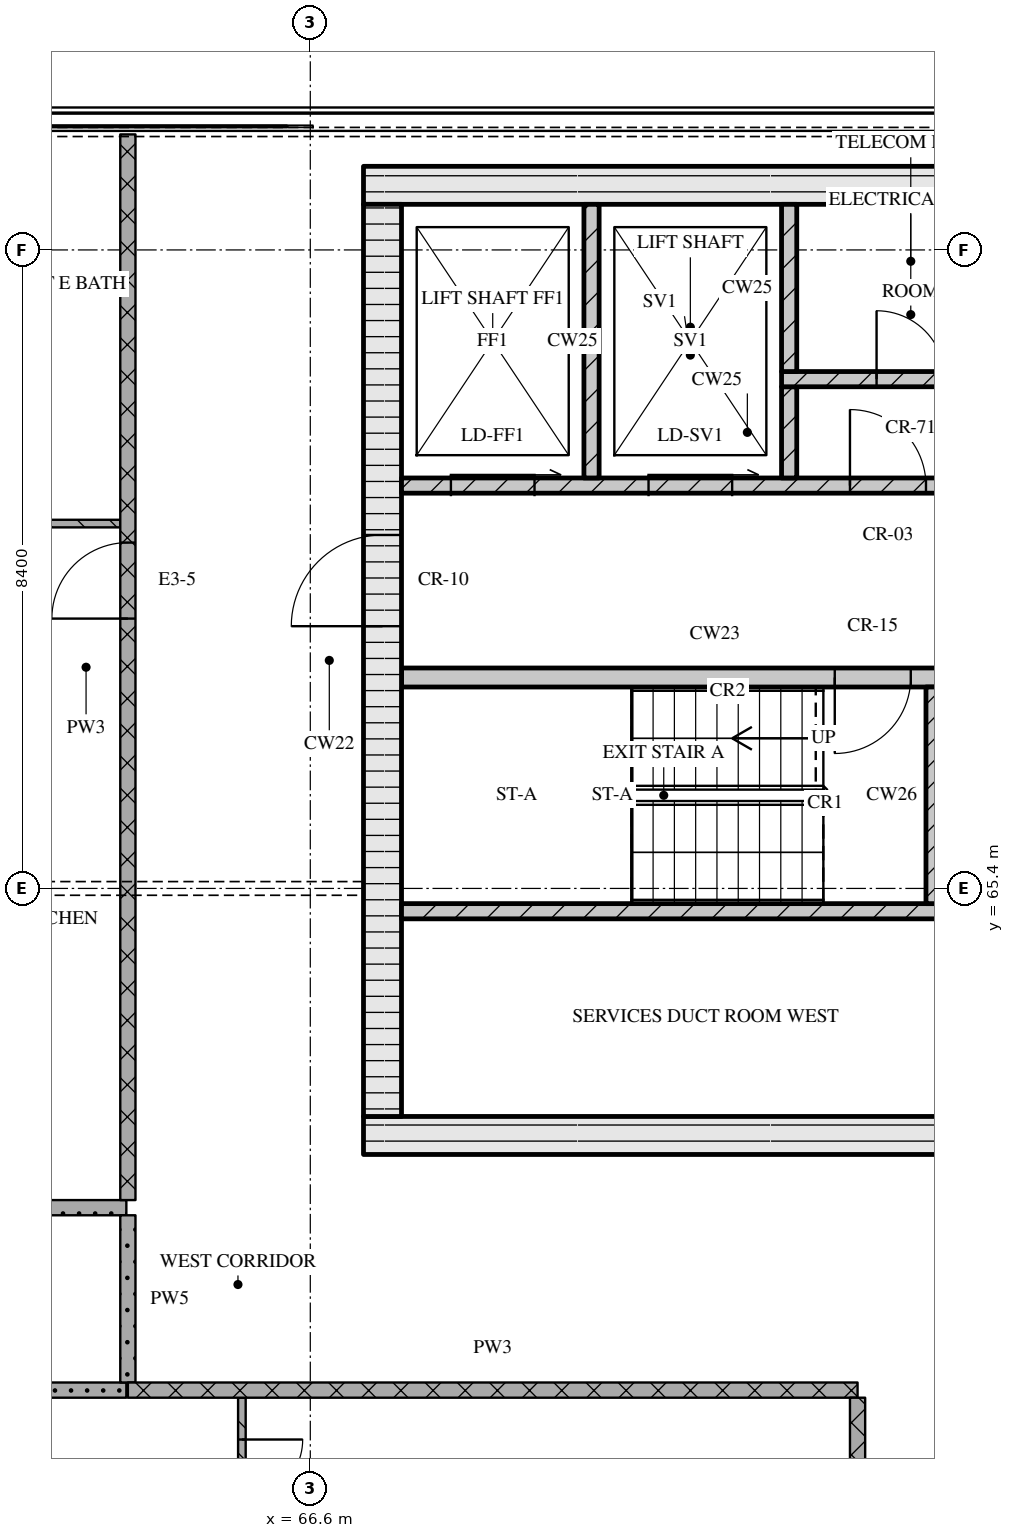
"""IFC4 building model, lengths in metres.
Left out: names, types, materials, properties, quantities, classifications, styles, units other than length and angle.
Written with IfcOpenShell. Run it as: python <this file> out.ifc"""

import sys

from ifc_helpers import new_model, si_unit, direction, frame, frame_2d, origin, place, context, subcontext, project, spatial, rectangle, extrude, element, fill, save


model = new_model("IFC4")
c1 = context("Model", 3, precision=1e-05, world=origin(), true_north=direction((0.0, 1.0)))
c2 = subcontext(c1, "Body", "Model", "MODEL_VIEW")
j1 = project(units=[si_unit("LENGTHUNIT", "METRE"), si_unit("PLANEANGLEUNIT", "RADIAN")], contexts=[c1])
p1 = place(None, origin())
s1 = spatial("IfcSite", under=j1, at=p1, CompositionType="ELEMENT")
p2 = place(p1, origin())
s2 = spatial("IfcBuilding", under=s1, at=p2, CompositionType="ELEMENT")
p3 = place(p2, frame((0.0, 0.0, 281.55)))
s3 = spatial("IfcBuildingStorey", under=s2, at=p3, CompositionType="ELEMENT", Elevation=281.55)
p4 = place(p3, frame((67.3, 62.15, 0.0), z_axis=(0.0, 0.0, 1.0), x_axis=(1.0, 0.0, 0.0)))
e1 = element("IfcWall", 1, at=p4, inside=s3, PredefinedType="SOLIDWALL", context=c2, shape_type="SweptSolid", body=[
    extrude(rectangle(XDim=40.6, YDim=0.5, at=frame_2d((20.3, 0.0))), origin(), (0.0, 0.0, 1.0), 3.32),
])
p5 = place(p4, frame((20.65, 0.0, 0.0)))
e2 = element("IfcOpeningElement", 2, at=p5, cuts=e1, PredefinedType="OPENING", context=c2, shape_type="SweptSolid", body=[
    extrude(rectangle(XDim=1.8, YDim=2.1, at=frame_2d((0.9, 1.05))), frame((0.0, 0.26, 0.0), z_axis=(0.0, -1.0, 0.0), x_axis=(1.0, 0.0, 0.0)), (0.0, 0.0, 1.0), 0.52),
])
p6 = place(p3, frame((67.3, 74.65, 0.0), z_axis=(0.0, 0.0, 1.0), x_axis=(1.0, 0.0, 0.0)))
e3 = element("IfcWall", 3, at=p6, inside=s3, PredefinedType="SOLIDWALL", context=c2, shape_type="SweptSolid", body=[
    extrude(rectangle(XDim=40.6, YDim=0.5, at=frame_2d((20.3, 0.0))), origin(), (0.0, 0.0, 1.0), 3.32),
])
p7 = place(p3, frame((67.55, 62.4, 0.0), z_axis=(0.0, 0.0, 1.0), x_axis=(0.0, 1.0, 0.0)))
e4 = element("IfcWall", 4, at=p7, inside=s3, PredefinedType="SOLIDWALL", context=c2, shape_type="SweptSolid", body=[
    extrude(rectangle(XDim=12.0, YDim=0.5, at=frame_2d((6.0, 0.0))), origin(), (0.0, 0.0, 1.0), 3.32),
])
p8 = place(p7, frame((6.45, 0.0, 0.0)))
e5 = element("IfcOpeningElement", 5, at=p8, cuts=e4, PredefinedType="OPENING", context=c2, shape_type="SweptSolid", body=[
    extrude(rectangle(XDim=1.2, YDim=2.1, at=frame_2d((0.6, 1.05))), frame((0.0, 0.26, 0.0), z_axis=(0.0, -1.0, 0.0), x_axis=(1.0, 0.0, 0.0)), (0.0, 0.0, 1.0), 0.52),
])
p9 = place(p3, frame((67.8, 65.1, 0.0), z_axis=(0.0, 0.0, 1.0), x_axis=(1.0, 0.0, 0.0)))
e6 = element("IfcWall", 6, at=p9, inside=s3, PredefinedType="SOLIDWALL", context=c2, shape_type="SweptSolid", body=[
    extrude(rectangle(XDim=18.5, YDim=0.2, at=frame_2d((9.25, 0.0))), origin(), (0.0, 0.0, 1.0), 3.32),
])
p10 = place(p9, frame((7.27, 0.0, 0.0)))
e7 = element("IfcOpeningElement", 7, at=p10, cuts=e6, PredefinedType="OPENING", context=c2, shape_type="SweptSolid", body=[
    extrude(rectangle(XDim=0.9, YDim=2.1, at=frame_2d((0.45, 1.05))), frame((0.0, 0.11, 0.0), z_axis=(0.0, -1.0, 0.0), x_axis=(1.0, 0.0, 0.0)), (0.0, 0.0, 1.0), 0.22),
])
p11 = place(p9, frame((9.05, 0.0, 0.0)))
e8 = element("IfcOpeningElement", 8, at=p11, cuts=e6, PredefinedType="OPENING", context=c2, shape_type="SweptSolid", body=[
    extrude(rectangle(XDim=0.9, YDim=2.1, at=frame_2d((0.45, 1.05))), frame((0.0, 0.11, 0.0), z_axis=(0.0, -1.0, 0.0), x_axis=(1.0, 0.0, 0.0)), (0.0, 0.0, 1.0), 0.22),
])
p12 = place(p9, frame((12.76, 0.0, 0.0)))
e9 = element("IfcOpeningElement", 9, at=p12, cuts=e6, PredefinedType="OPENING", context=c2, shape_type="SweptSolid", body=[
    extrude(rectangle(XDim=0.9, YDim=2.1, at=frame_2d((0.45, 1.05))), frame((0.0, 0.11, 0.0), z_axis=(0.0, -1.0, 0.0), x_axis=(1.0, 0.0, 0.0)), (0.0, 0.0, 1.0), 0.22),
])
p13 = place(p9, frame((16.7, 0.0, 0.0)))
e10 = element("IfcOpeningElement", 10, at=p13, cuts=e6, PredefinedType="OPENING", context=c2, shape_type="SweptSolid", body=[
    extrude(rectangle(XDim=0.9, YDim=2.1, at=frame_2d((0.45, 1.05))), frame((0.0, 0.11, 0.0), z_axis=(0.0, -1.0, 0.0), x_axis=(1.0, 0.0, 0.0)), (0.0, 0.0, 1.0), 0.22),
])
p14 = place(p3, frame((74.85, 65.2, 0.0), z_axis=(0.0, 0.0, 1.0), x_axis=(0.0, 1.0, 0.0)))
e11 = element("IfcWall", 11, at=p14, inside=s3, PredefinedType="SOLIDWALL", context=c2, shape_type="SweptSolid", body=[
    extrude(rectangle(XDim=2.85, YDim=0.3, at=frame_2d((1.425, 0.0))), origin(), (0.0, 0.0, 1.0), 3.32),
])
p15 = place(p3, frame((67.8, 68.175, 0.0), z_axis=(0.0, 0.0, 1.0), x_axis=(1.0, 0.0, 0.0)))
e12 = element("IfcWall", 12, at=p15, inside=s3, PredefinedType="SOLIDWALL", context=c2, shape_type="SweptSolid", body=[
    extrude(rectangle(XDim=8.25, YDim=0.25, at=frame_2d((4.125, 0.0))), origin(), (0.0, 0.0, 1.0), 3.32),
])
p16 = place(p15, frame((5.7, 0.0, 0.0)))
e13 = element("IfcOpeningElement", 13, at=p16, cuts=e12, PredefinedType="OPENING", context=c2, shape_type="SweptSolid", body=[
    extrude(rectangle(XDim=1.0, YDim=2.1, at=frame_2d((0.5, 1.05))), frame((0.0, 0.135, 0.0), z_axis=(0.0, -1.0, 0.0), x_axis=(1.0, 0.0, 0.0)), (0.0, 0.0, 1.0), 0.27),
])
p17 = place(p15, frame((7.2, 0.0, 0.0)))
e14 = element("IfcOpeningElement", 14, at=p17, cuts=e12, PredefinedType="OPENING", context=c2, shape_type="SweptSolid", body=[
    extrude(rectangle(XDim=0.8, YDim=2.1, at=frame_2d((0.4, 1.05))), frame((0.0, 0.135, 0.0), z_axis=(0.0, -1.0, 0.0), x_axis=(1.0, 0.0, 0.0)), (0.0, 0.0, 1.0), 0.27),
])
p18 = place(p3, frame((67.8, 70.7, 0.0), z_axis=(0.0, 0.0, 1.0), x_axis=(1.0, 0.0, 0.0)))
e15 = element("IfcWall", 15, at=p18, inside=s3, PredefinedType="SOLIDWALL", context=c2, shape_type="SweptSolid", body=[
    extrude(rectangle(XDim=39.6, YDim=0.2, at=frame_2d((19.8, 0.0))), origin(), (0.0, 0.0, 1.0), 3.32),
])
p19 = place(p18, frame((0.65, 0.0, 0.0)))
e16 = element("IfcOpeningElement", 16, at=p19, cuts=e15, PredefinedType="OPENING", context=c2, shape_type="SweptSolid", body=[
    extrude(rectangle(XDim=1.1, YDim=2.1, at=frame_2d((0.55, 1.05))), frame((0.0, 0.11, 0.0), z_axis=(0.0, -1.0, 0.0), x_axis=(1.0, 0.0, 0.0)), (0.0, 0.0, 1.0), 0.22),
])
p20 = place(p18, frame((3.25, 0.0, 0.0)))
e17 = element("IfcOpeningElement", 17, at=p20, cuts=e15, PredefinedType="OPENING", context=c2, shape_type="SweptSolid", body=[
    extrude(rectangle(XDim=1.1, YDim=2.1, at=frame_2d((0.55, 1.05))), frame((0.0, 0.11, 0.0), z_axis=(0.0, -1.0, 0.0), x_axis=(1.0, 0.0, 0.0)), (0.0, 0.0, 1.0), 0.22),
])
p21 = place(p18, frame((5.9, 0.0, 0.0)))
e18 = element("IfcOpeningElement", 18, at=p21, cuts=e15, PredefinedType="OPENING", context=c2, shape_type="SweptSolid", body=[
    extrude(rectangle(XDim=1.0, YDim=2.1, at=frame_2d((0.5, 1.05))), frame((0.0, 0.11, 0.0), z_axis=(0.0, -1.0, 0.0), x_axis=(1.0, 0.0, 0.0)), (0.0, 0.0, 1.0), 0.22),
])
p22 = place(p18, frame((21.7, 0.0, 0.0)))
e19 = element("IfcOpeningElement", 19, at=p22, cuts=e15, PredefinedType="OPENING", context=c2, shape_type="SweptSolid", body=[
    extrude(rectangle(XDim=1.0, YDim=2.1, at=frame_2d((0.5, 1.05))), frame((0.0, 0.11, 0.0), z_axis=(0.0, -1.0, 0.0), x_axis=(1.0, 0.0, 0.0)), (0.0, 0.0, 1.0), 0.22),
])
p23 = place(p18, frame((32.7, 0.0, 0.0)))
e20 = element("IfcOpeningElement", 20, at=p23, cuts=e15, PredefinedType="OPENING", context=c2, shape_type="SweptSolid", body=[
    extrude(rectangle(XDim=1.0, YDim=2.1, at=frame_2d((0.5, 1.05))), frame((0.0, 0.11, 0.0), z_axis=(0.0, -1.0, 0.0), x_axis=(1.0, 0.0, 0.0)), (0.0, 0.0, 1.0), 0.22),
])
p24 = place(p18, frame((35.25, 0.0, 0.0)))
e21 = element("IfcOpeningElement", 21, at=p24, cuts=e15, PredefinedType="OPENING", context=c2, shape_type="SweptSolid", body=[
    extrude(rectangle(XDim=1.1, YDim=2.1, at=frame_2d((0.55, 1.05))), frame((0.0, 0.11, 0.0), z_axis=(0.0, -1.0, 0.0), x_axis=(1.0, 0.0, 0.0)), (0.0, 0.0, 1.0), 0.22),
])
p25 = place(p18, frame((37.85, 0.0, 0.0)))
e22 = element("IfcOpeningElement", 22, at=p25, cuts=e15, PredefinedType="OPENING", context=c2, shape_type="SweptSolid", body=[
    extrude(rectangle(XDim=1.1, YDim=2.1, at=frame_2d((0.55, 1.05))), frame((0.0, 0.11, 0.0), z_axis=(0.0, -1.0, 0.0), x_axis=(1.0, 0.0, 0.0)), (0.0, 0.0, 1.0), 0.22),
])
p26 = place(p3, frame((70.3, 70.8, 0.0), z_axis=(0.0, 0.0, 1.0), x_axis=(0.0, 1.0, 0.0)))
e23 = element("IfcWall", 23, at=p26, inside=s3, PredefinedType="SOLIDWALL", context=c2, shape_type="SweptSolid", body=[
    extrude(rectangle(XDim=3.6, YDim=0.2, at=frame_2d((1.8, 0.0))), origin(), (0.0, 0.0, 1.0), 3.32),
])
p27 = place(p3, frame((72.9, 70.8, 0.0), z_axis=(0.0, 0.0, 1.0), x_axis=(0.0, 1.0, 0.0)))
e24 = element("IfcWall", 24, at=p27, inside=s3, PredefinedType="SOLIDWALL", context=c2, shape_type="SweptSolid", body=[
    extrude(rectangle(XDim=1.2, YDim=0.2, at=frame_2d((0.6, 0.0))), origin(), (0.0, 0.0, 1.0), 3.32),
])
p28 = place(p3, frame((72.8, 72.1, 0.0), z_axis=(0.0, 0.0, 1.0), x_axis=(1.0, 0.0, 0.0)))
e25 = element("IfcWall", 25, at=p28, inside=s3, PredefinedType="SOLIDWALL", context=c2, shape_type="SweptSolid", body=[
    extrude(rectangle(XDim=7.72, YDim=0.2, at=frame_2d((3.86, 0.0))), origin(), (0.0, 0.0, 1.0), 3.32),
])
p29 = place(p28, frame((1.25, 0.0, 0.0)))
e26 = element("IfcOpeningElement", 26, at=p29, cuts=e25, PredefinedType="OPENING", context=c2, shape_type="SweptSolid", body=[
    extrude(rectangle(XDim=0.9, YDim=2.1, at=frame_2d((0.45, 1.05))), frame((0.0, 0.11, 0.0), z_axis=(0.0, -1.0, 0.0), x_axis=(1.0, 0.0, 0.0)), (0.0, 0.0, 1.0), 0.22),
])
p30 = place(p28, frame((4.2, 0.0, 0.0)))
e27 = element("IfcOpeningElement", 27, at=p30, cuts=e25, PredefinedType="OPENING", context=c2, shape_type="SweptSolid", body=[
    extrude(rectangle(XDim=0.9, YDim=2.1, at=frame_2d((0.45, 1.05))), frame((0.0, 0.11, 0.0), z_axis=(0.0, -1.0, 0.0), x_axis=(1.0, 0.0, 0.0)), (0.0, 0.0, 1.0), 0.22),
])
p31 = place(p28, frame((6.36, 0.0, 0.0)))
e28 = element("IfcOpeningElement", 28, at=p31, cuts=e25, PredefinedType="OPENING", context=c2, shape_type="SweptSolid", body=[
    extrude(rectangle(XDim=0.9, YDim=2.1, at=frame_2d((0.45, 1.05))), frame((0.0, 0.11, 0.0), z_axis=(0.0, -1.0, 0.0), x_axis=(1.0, 0.0, 0.0)), (0.0, 0.0, 1.0), 0.22),
])
p32 = place(p3, frame((72.9, 72.2, 0.0), z_axis=(0.0, 0.0, 1.0), x_axis=(0.0, 1.0, 0.0)))
e29 = element("IfcWall", 29, at=p32, inside=s3, PredefinedType="SOLIDWALL", context=c2, shape_type="SweptSolid", body=[
    extrude(rectangle(XDim=2.2, YDim=0.2, at=frame_2d((1.1, 0.0))), origin(), (0.0, 0.0, 1.0), 3.32),
])
p33 = place(p3, frame((64.2, 58.8, 0.0), z_axis=(0.0, 0.0, 1.0), x_axis=(1.0, 0.0, 0.0)))
e30 = element("IfcWall", 30, at=p33, inside=s3, PredefinedType="PARTITIONING", context=c2, shape_type="SweptSolid", body=[
    extrude(rectangle(XDim=9.6, YDim=0.2, at=frame_2d((4.8, 0.0))), origin(), (0.0, 0.0, 1.0), 3.32),
])
p34 = place(p3, frame((56.7, 58.8, 0.0), z_axis=(0.0, 0.0, 1.0), x_axis=(1.0, 0.0, 0.0)))
e31 = element("IfcWall", 31, at=p34, inside=s3, PredefinedType="PARTITIONING", context=c2, shape_type="SweptSolid", body=[
    extrude(rectangle(XDim=7.48, YDim=0.2, at=frame_2d((3.74, 0.0))), origin(), (0.0, 0.0, 1.0), 3.32),
])
p35 = place(p3, frame((61.52, 61.2, 0.0), z_axis=(0.0, 0.0, 1.0), x_axis=(1.0, 0.0, 0.0)))
e32 = element("IfcWall", 32, at=p35, inside=s3, PredefinedType="PARTITIONING", context=c2, shape_type="SweptSolid", body=[
    extrude(rectangle(XDim=2.66, YDim=0.2, at=frame_2d((1.33, 0.0))), origin(), (0.0, 0.0, 1.0), 3.32),
])
p36 = place(p3, frame((61.5, 70.2, 0.0), z_axis=(0.0, 0.0, 1.0), x_axis=(1.0, 0.0, 0.0)))
e33 = element("IfcWall", 33, at=p36, inside=s3, PredefinedType="PARTITIONING", context=c2, shape_type="SweptSolid", body=[
    extrude(rectangle(XDim=2.6, YDim=0.1, at=frame_2d((1.3, 0.0))), origin(), (0.0, 0.0, 1.0), 3.32),
])
p37 = place(p3, frame((64.2, 61.3, 0.0), z_axis=(0.0, 0.0, 1.0), x_axis=(0.0, 1.0, 0.0)))
e34 = element("IfcWall", 34, at=p37, inside=s3, PredefinedType="PARTITIONING", context=c2, shape_type="SweptSolid", body=[
    extrude(rectangle(XDim=14.02, YDim=0.2, at=frame_2d((7.01, 0.0))), origin(), (0.0, 0.0, 1.0), 3.32),
])
p38 = place(p37, frame((7.65, 0.0, 0.0)))
e35 = element("IfcOpeningElement", 35, at=p38, cuts=e34, PredefinedType="OPENING", context=c2, shape_type="SweptSolid", body=[
    extrude(rectangle(XDim=1.0, YDim=2.1, at=frame_2d((0.5, 1.05))), frame((0.0, 0.11, 0.0), z_axis=(0.0, -1.0, 0.0), x_axis=(1.0, 0.0, 0.0)), (0.0, 0.0, 1.0), 0.22),
])
p39 = place(p3, frame((64.2, 61.1, 0.0), z_axis=(0.0, 0.0, 1.0), x_axis=(0.0, -1.0, 0.0)))
e36 = element("IfcWall", 36, at=p39, inside=s3, PredefinedType="PARTITIONING", context=c2, shape_type="SweptSolid", body=[
    extrude(rectangle(XDim=2.2, YDim=0.2, at=frame_2d((1.1, 0.0))), origin(), (0.0, 0.0, 1.0), 3.32),
])
p40 = place(p3, frame((65.7, 58.7, 0.0), z_axis=(0.0, 0.0, 1.0), x_axis=(0.0, -1.0, 0.0)))
e37 = element("IfcWall", 37, at=p40, inside=s3, PredefinedType="PARTITIONING", context=c2, shape_type="SweptSolid", body=[
    extrude(rectangle(XDim=2.25, YDim=0.1, at=frame_2d((1.125, 0.0))), origin(), (0.0, 0.0, 1.0), 3.32),
])
p41 = place(p40, frame((0.55, 0.0, 0.0)))
e38 = element("IfcOpeningElement", 38, at=p41, cuts=e37, PredefinedType="OPENING", context=c2, shape_type="SweptSolid", body=[
    extrude(rectangle(XDim=0.8, YDim=2.1, at=frame_2d((0.4, 1.05))), frame((0.0, 0.06, 0.0), z_axis=(0.0, -1.0, 0.0), x_axis=(1.0, 0.0, 0.0)), (0.0, 0.0, 1.0), 0.12),
])
p42 = place(p3, frame((73.8, 50.7, 0.0), z_axis=(0.0, 0.0, 1.0), x_axis=(0.0, 1.0, 0.0)))
e39 = element("IfcWall", 39, at=p42, inside=s3, PredefinedType="PARTITIONING", context=c2, shape_type="SweptSolid", body=[
    extrude(rectangle(XDim=8.0, YDim=0.2, at=frame_2d((4.0, 0.0))), origin(), (0.0, 0.0, 1.0), 3.32),
])
p43 = place(p42, frame((4.45, 0.0, 0.0)))
e40 = element("IfcOpeningElement", 40, at=p43, cuts=e39, PredefinedType="OPENING", context=c2, shape_type="SweptSolid", body=[
    extrude(rectangle(XDim=1.0, YDim=2.1, at=frame_2d((0.5, 1.05))), frame((0.0, 0.11, 0.0), z_axis=(0.0, -1.0, 0.0), x_axis=(1.0, 0.0, 0.0)), (0.0, 0.0, 1.0), 0.22),
])
p44 = place(p16, origin())
e41 = element("IfcDoor", 41, at=p44, inside=s3, OperationType="SINGLE_SWING_RIGHT", PredefinedType="DOOR", context=c2, shape_type="SweptSolid", body=[
    extrude(rectangle(XDim=1.0, YDim=2.1, at=frame_2d((0.5, 1.05))), frame((0.0, 0.025, 0.0), z_axis=(0.0, -1.0, 0.0), x_axis=(1.0, 0.0, 0.0)), (0.0, 0.0, 1.0), 0.05),
])
fill(e13, e41)
p45 = place(p8, origin())
e42 = element("IfcDoor", 42, at=p45, inside=s3, OperationType="SINGLE_SWING_LEFT", PredefinedType="DOOR", context=c2, shape_type="SweptSolid", body=[
    extrude(rectangle(XDim=1.2, YDim=2.1, at=frame_2d((0.6, 1.05))), frame((0.0, 0.025, 0.0), z_axis=(0.0, -1.0, 0.0), x_axis=(1.0, 0.0, 0.0)), (0.0, 0.0, 1.0), 0.05),
])
fill(e5, e42)
p46 = place(p19, origin())
e43 = element("IfcDoor", 43, at=p46, inside=s3, OperationType="SLIDING_TO_RIGHT", PredefinedType="DOOR", context=c2, shape_type="SweptSolid", body=[
    extrude(rectangle(XDim=1.1, YDim=2.1, at=frame_2d((0.55, 1.05))), frame((0.0, 0.025, 0.0), z_axis=(0.0, -1.0, 0.0), x_axis=(1.0, 0.0, 0.0)), (0.0, 0.0, 1.0), 0.05),
])
fill(e16, e43)
p47 = place(p20, origin())
e44 = element("IfcDoor", 44, at=p47, inside=s3, OperationType="SLIDING_TO_RIGHT", PredefinedType="DOOR", context=c2, shape_type="SweptSolid", body=[
    extrude(rectangle(XDim=1.1, YDim=2.1, at=frame_2d((0.55, 1.05))), frame((0.0, 0.025, 0.0), z_axis=(0.0, -1.0, 0.0), x_axis=(1.0, 0.0, 0.0)), (0.0, 0.0, 1.0), 0.05),
])
fill(e17, e44)
p48 = place(p21, origin())
e45 = element("IfcDoor", 45, at=p48, inside=s3, OperationType="SINGLE_SWING_LEFT", PredefinedType="DOOR", context=c2, shape_type="SweptSolid", body=[
    extrude(rectangle(XDim=1.0, YDim=2.1, at=frame_2d((0.5, 1.05))), frame((0.0, 0.025, 0.0), z_axis=(0.0, -1.0, 0.0), x_axis=(1.0, 0.0, 0.0)), (0.0, 0.0, 1.0), 0.05),
])
fill(e18, e45)
p49 = place(p29, origin())
e46 = element("IfcDoor", 46, at=p49, inside=s3, OperationType="SINGLE_SWING_LEFT", PredefinedType="DOOR", context=c2, shape_type="SweptSolid", body=[
    extrude(rectangle(XDim=0.9, YDim=2.1, at=frame_2d((0.45, 1.05))), frame((0.0, 0.025, 0.0), z_axis=(0.0, -1.0, 0.0), x_axis=(1.0, 0.0, 0.0)), (0.0, 0.0, 1.0), 0.05),
])
fill(e26, e46)
p50 = place(p38, origin())
e47 = element("IfcDoor", 47, at=p50, inside=s3, OperationType="SINGLE_SWING_LEFT", PredefinedType="DOOR", context=c2, shape_type="SweptSolid", body=[
    extrude(rectangle(XDim=1.0, YDim=2.1, at=frame_2d((0.5, 1.05))), frame((0.0, 0.025, 0.0), z_axis=(0.0, -1.0, 0.0), x_axis=(1.0, 0.0, 0.0)), (0.0, 0.0, 1.0), 0.05),
])
fill(e35, e47)
p51 = place(p41, origin())
e48 = element("IfcDoor", 48, at=p51, inside=s3, OperationType="SINGLE_SWING_LEFT", PredefinedType="DOOR", context=c2, shape_type="SweptSolid", body=[
    extrude(rectangle(XDim=0.8, YDim=2.1, at=frame_2d((0.4, 1.05))), frame((0.0, 0.025, 0.0), z_axis=(0.0, -1.0, 0.0), x_axis=(1.0, 0.0, 0.0)), (0.0, 0.0, 1.0), 0.05),
])
fill(e38, e48)
save(model, sys.argv[1])
